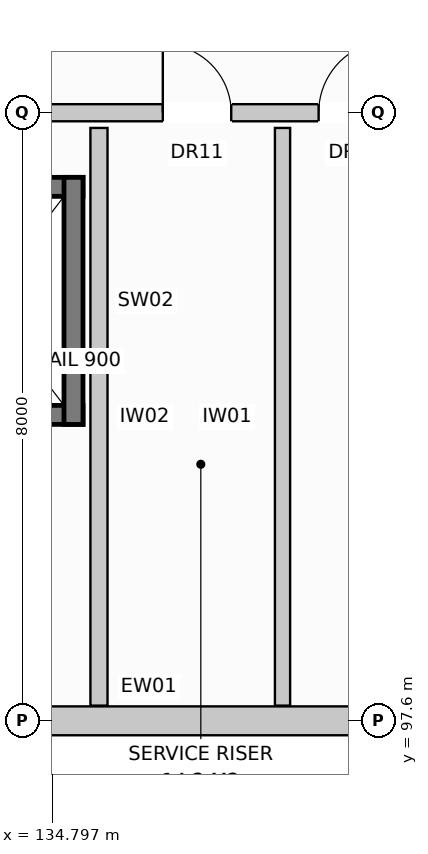
"""IFC4 building model, lengths in metres.
Left out: names, types, materials, properties, quantities, classifications, styles, units other than length and angle.
Written with IfcOpenShell. Run it as: python <this file> out.ifc"""

import sys

from ifc_helpers import new_model, si_unit, direction, frame, frame_2d, origin, origin_with_axes, place, context, subcontext, project, spatial, rectangle, extrude, element, fill, save


model = new_model("IFC4")
c1 = context("Model", 3, precision=1e-05, world=origin(), true_north=direction((0.0, 1.0)))
c2 = subcontext(c1, "Body", "Model", "MODEL_VIEW")
j1 = project(units=[si_unit("LENGTHUNIT", "METRE"), si_unit("PLANEANGLEUNIT", "RADIAN")], contexts=[c1])
p1 = place(None, origin())
s1 = spatial("IfcSite", under=j1, at=p1, CompositionType="ELEMENT")
p2 = place(p1, origin())
s2 = spatial("IfcBuilding", under=s1, at=p2, CompositionType="ELEMENT")
p3 = place(p2, frame((0.0, 0.0, 4.4)))
s3 = spatial("IfcBuildingStorey", under=s2, at=p3, CompositionType="ELEMENT", Elevation=4.4)
p4 = place(p3, frame((130.35, 97.6, 0.0), z_axis=(0.0, 0.0, 1.0), x_axis=(1.0, 0.0, 0.0)))
e1 = element("IfcWall", 1, at=p4, inside=s3, PredefinedType="STANDARD", context=c2, shape_type="SweptSolid", body=[
    extrude(rectangle(XDim=17.4, YDim=0.38, at=frame_2d((8.7, 0.0))), origin(), (0.0, 0.0, 1.0), 3.33),
])
p5 = place(p4, frame((11.892, 0.0, 0.0)))
e2 = element("IfcOpeningElement", 2, at=p5, cuts=e1, PredefinedType="OPENING", context=c2, shape_type="SweptSolid", body=[
    extrude(rectangle(XDim=0.95, YDim=2.1, at=frame_2d((0.475, 1.05))), frame((0.0, 0.202, 0.0), z_axis=(0.0, -1.0, 0.0), x_axis=(1.0, 0.0, 0.0)), (0.0, 0.0, 1.0), 0.404),
])
p6 = place(p4, frame((10.62, 0.0, 0.9)))
e3 = element("IfcOpeningElement", 3, at=p6, cuts=e1, PredefinedType="OPENING", context=c2, shape_type="SweptSolid", body=[
    extrude(rectangle(XDim=0.95, YDim=1.55, at=frame_2d((0.475, 0.775))), frame((0.0, 0.202, 0.0), z_axis=(0.0, -1.0, 0.0), x_axis=(1.0, 0.0, 0.0)), (0.0, 0.0, 1.0), 0.404),
])
p7 = place(p4, frame((14.548, 0.0, 0.8)))
e4 = element("IfcOpeningElement", 4, at=p7, cuts=e1, PredefinedType="OPENING", context=c2, shape_type="SweptSolid", body=[
    extrude(rectangle(XDim=1.95, YDim=1.65, at=frame_2d((0.975, 0.825))), frame((0.0, 0.202, 0.0), z_axis=(0.0, -1.0, 0.0), x_axis=(1.0, 0.0, 0.0)), (0.0, 0.0, 1.0), 0.404),
])
p8 = place(p3, frame((132.6, 101.625, 0.0), z_axis=(0.0, 0.0, 1.0), x_axis=(1.0, 0.0, 0.0)))
e5 = element("IfcWall", 5, at=p8, inside=s3, PredefinedType="SHEAR", context=c2, shape_type="SweptSolid", body=[
    extrude(rectangle(XDim=2.6, YDim=0.25, at=frame_2d((1.3, 0.0))), origin(), (0.0, 0.0, 1.0), 3.33),
])
p9 = place(p8, frame((0.875, 0.0, 0.0)))
e6 = element("IfcOpeningElement", 6, at=p9, cuts=e5, PredefinedType="OPENING", context=c2, shape_type="SweptSolid", body=[
    extrude(rectangle(XDim=1.1, YDim=2.1, at=frame_2d((0.55, 1.05))), frame((0.0, 0.137, 0.0), z_axis=(0.0, -1.0, 0.0), x_axis=(1.0, 0.0, 0.0)), (0.0, 0.0, 1.0), 0.274),
])
p10 = place(p3, frame((132.6, 104.625, 0.0), z_axis=(0.0, 0.0, 1.0), x_axis=(1.0, 0.0, 0.0)))
e7 = element("IfcWall", 7, at=p10, inside=s3, PredefinedType="SHEAR", context=c2, shape_type="SweptSolid", body=[
    extrude(rectangle(XDim=2.6, YDim=0.25, at=frame_2d((1.3, 0.0))), origin(), (0.0, 0.0, 1.0), 3.33),
])
p11 = place(p3, frame((135.075, 101.5, 0.0), z_axis=(0.0, 0.0, 1.0), x_axis=(0.0, 1.0, 0.0)))
e8 = element("IfcWall", 8, at=p11, inside=s3, PredefinedType="SHEAR", context=c2, shape_type="SweptSolid", body=[
    extrude(rectangle(XDim=3.25, YDim=0.25, at=frame_2d((1.625, 0.0))), origin(), (0.0, 0.0, 1.0), 3.33),
])
p12 = place(p3, frame((135.41, 97.8, 0.0), z_axis=(0.0, 0.0, 1.0), x_axis=(0.0, 1.0, 0.0)))
e9 = element("IfcWall", 9, at=p12, inside=s3, PredefinedType="PARTITIONING", context=c2, shape_type="SweptSolid", body=[
    extrude(rectangle(XDim=7.6, YDim=0.225, at=frame_2d((3.8, 0.0))), origin(), (0.0, 0.0, 1.0), 2.99),
])
p13 = place(p3, frame((137.825, 97.8, 0.0), z_axis=(0.0, 0.0, 1.0), x_axis=(0.0, 1.0, 0.0)))
e10 = element("IfcWall", 10, at=p13, inside=s3, PredefinedType="PARTITIONING", context=c2, shape_type="SweptSolid", body=[
    extrude(rectangle(XDim=7.6, YDim=0.2, at=frame_2d((3.8, 0.0))), origin(), (0.0, 0.0, 1.0), 3.33),
])
p14 = place(p3, frame((130.5, 105.6, 0.0), z_axis=(0.0, 0.0, 1.0), x_axis=(1.0, 0.0, 0.0)))
e11 = element("IfcWall", 11, at=p14, inside=s3, PredefinedType="PARTITIONING", context=c2, shape_type="SweptSolid", body=[
    extrude(rectangle(XDim=9.9, YDim=0.225, at=frame_2d((4.95, 0.0))), origin(), (0.0, 0.0, 1.0), 2.77),
])
p15 = place(p14, frame((0.475, 0.0, 0.0)))
e12 = element("IfcOpeningElement", 12, at=p15, cuts=e11, PredefinedType="OPENING", context=c2, shape_type="SweptSolid", body=[
    extrude(rectangle(XDim=1.1, YDim=2.15, at=frame_2d((0.55, 1.075))), frame((0.0, 0.125, 0.0), z_axis=(0.0, -1.0, 0.0), x_axis=(1.0, 0.0, 0.0)), (0.0, 0.0, 1.0), 0.249),
])
p16 = place(p14, frame((5.75, 0.0, 0.0)))
e13 = element("IfcOpeningElement", 13, at=p16, cuts=e11, PredefinedType="OPENING", context=c2, shape_type="SweptSolid", body=[
    extrude(rectangle(XDim=0.9, YDim=2.1, at=frame_2d((0.45, 1.05))), frame((0.0, 0.125, 0.0), z_axis=(0.0, -1.0, 0.0), x_axis=(1.0, 0.0, 0.0)), (0.0, 0.0, 1.0), 0.249),
])
p17 = place(p14, frame((7.8, 0.0, 0.0)))
e14 = element("IfcOpeningElement", 14, at=p17, cuts=e11, PredefinedType="OPENING", context=c2, shape_type="SweptSolid", body=[
    extrude(rectangle(XDim=0.95, YDim=2.15, at=frame_2d((0.475, 1.075))), frame((0.0, 0.125, 0.0), z_axis=(0.0, -1.0, 0.0), x_axis=(1.0, 0.0, 0.0)), (0.0, 0.0, 1.0), 0.249),
])
p18 = place(p16, origin_with_axes())
e15 = element("IfcDoor", 15, at=p18, inside=s3, OperationType="SINGLE_SWING_LEFT", PredefinedType="DOOR", context=c2, shape_type="SweptSolid", body=[
    extrude(rectangle(XDim=0.9, YDim=2.1, at=frame_2d((0.45, 1.05))), frame((0.0, 0.025, 0.0), z_axis=(0.0, -1.0, 0.0), x_axis=(1.0, 0.0, 0.0)), (0.0, 0.0, 1.0), 0.05),
])
fill(e13, e15)
p19 = place(p17, origin_with_axes())
e16 = element("IfcDoor", 16, at=p19, inside=s3, OperationType="SINGLE_SWING_RIGHT", PredefinedType="DOOR", context=c2, shape_type="SweptSolid", body=[
    extrude(rectangle(XDim=0.95, YDim=2.15, at=frame_2d((0.475, 1.075))), frame((0.0, 0.025, 0.0), z_axis=(0.0, -1.0, 0.0), x_axis=(1.0, 0.0, 0.0)), (0.0, 0.0, 1.0), 0.05),
])
fill(e14, e16)
save(model, sys.argv[1])
